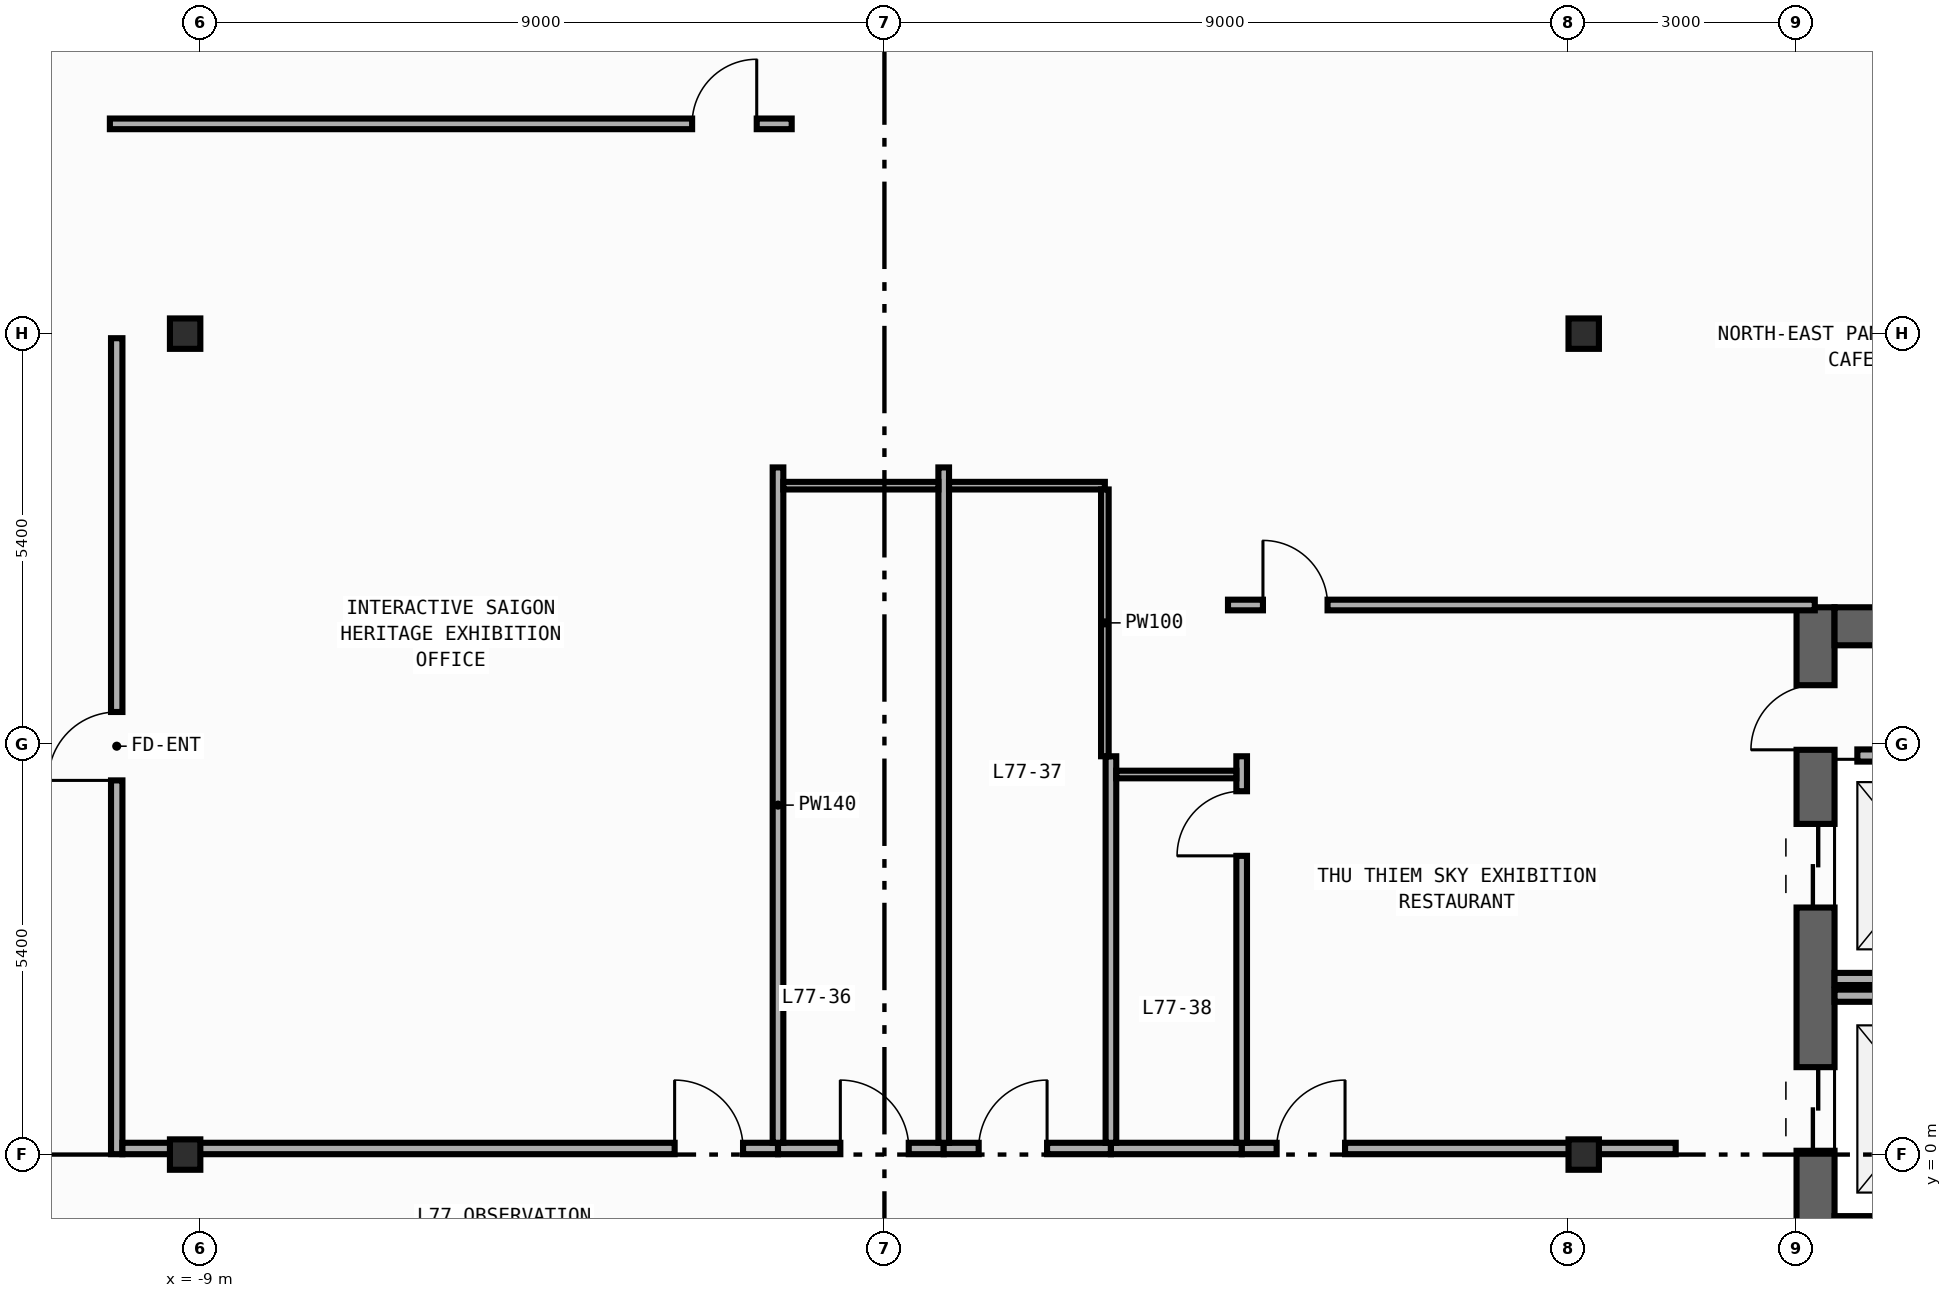
"""IFC4 building model, lengths in metres.
Left out: names, types, materials, properties, quantities, classifications, styles, units other than length and angle.
Written with IfcOpenShell. Run it as: python <this file> out.ifc"""

import sys

from ifc_helpers import new_model, si_unit, direction, frame, frame_2d, origin, origin_2d, place, context, subcontext, project, spatial, rectangle, i_section, extrude, element, fill, save


model = new_model("IFC4")
c1 = context("Model", 3, precision=1e-05, world=origin(), true_north=direction((0.0, 1.0)))
c2 = subcontext(c1, "Body", "Model", "MODEL_VIEW")
j1 = project(units=[si_unit("LENGTHUNIT", "METRE"), si_unit("PLANEANGLEUNIT", "RADIAN")], contexts=[c1])
p1 = place(None, origin())
s1 = spatial("IfcSite", under=j1, at=p1, CompositionType="ELEMENT")
p2 = place(p1, origin())
s2 = spatial("IfcBuilding", under=s1, at=p2, CompositionType="ELEMENT")
p3 = place(p2, frame((0.0, 0.0, 320.4)))
s3 = spatial("IfcBuildingStorey", under=s2, at=p3, CompositionType="ELEMENT", Elevation=320.4)
p4 = place(p3, frame((12.25, -19.8, 0.0), z_axis=(0.0, 0.0, 1.0), x_axis=(0.0, 1.0, 0.0)))
e1 = element("IfcWall", 1, at=p4, inside=s3, PredefinedType="SHEAR", context=c2, shape_type="SweptSolid", body=[
    extrude(rectangle(XDim=27.0, YDim=0.5, at=frame_2d((13.5, 0.0))), origin(), (0.0, 0.0, 1.0), 4.45),
])
p5 = place(p4, frame((23.05, 0.0, 0.0)))
e2 = element("IfcOpeningElement", 2, at=p5, cuts=e1, PredefinedType="OPENING", context=c2, shape_type="SweptSolid", body=[
    extrude(rectangle(XDim=1.1, YDim=2.2, at=frame_2d((0.55, 1.1))), frame((0.0, 0.26, 0.0), z_axis=(0.0, -1.0, 0.0), x_axis=(1.0, 0.0, 0.0)), (0.0, 0.0, 1.0), 0.52),
])
p6 = place(p4, frame((19.85, 0.0, 0.0)))
e3 = element("IfcOpeningElement", 3, at=p6, cuts=e1, PredefinedType="OPENING", context=c2, shape_type="SweptSolid", body=[
    extrude(rectangle(XDim=1.1, YDim=2.2, at=frame_2d((0.55, 1.1))), frame((0.0, 0.26, 0.0), z_axis=(0.0, -1.0, 0.0), x_axis=(1.0, 0.0, 0.0)), (0.0, 0.0, 1.0), 0.52),
])
p7 = place(p4, frame((16.65, 0.0, 0.0)))
e4 = element("IfcOpeningElement", 4, at=p7, cuts=e1, PredefinedType="OPENING", context=c2, shape_type="SweptSolid", body=[
    extrude(rectangle(XDim=1.1, YDim=2.2, at=frame_2d((0.55, 1.1))), frame((0.0, 0.26, 0.0), z_axis=(0.0, -1.0, 0.0), x_axis=(1.0, 0.0, 0.0)), (0.0, 0.0, 1.0), 0.52),
])
p8 = place(p4, frame((10.175, 0.0, 0.0)))
e5 = element("IfcOpeningElement", 5, at=p8, cuts=e1, PredefinedType="OPENING", context=c2, shape_type="SweptSolid", body=[
    extrude(rectangle(XDim=0.85, YDim=2.1, at=frame_2d((0.425, 1.05))), frame((0.0, 0.26, 0.0), z_axis=(0.0, -1.0, 0.0), x_axis=(1.0, 0.0, 0.0)), (0.0, 0.0, 1.0), 0.52),
])
p9 = place(p4, frame((12.725, 0.0, 0.0)))
e6 = element("IfcOpeningElement", 6, at=p9, cuts=e1, PredefinedType="OPENING", context=c2, shape_type="SweptSolid", body=[
    extrude(rectangle(XDim=1.15, YDim=2.2, at=frame_2d((0.575, 1.1))), frame((0.0, 0.26, 0.0), z_axis=(0.0, -1.0, 0.0), x_axis=(1.0, 0.0, 0.0)), (0.0, 0.0, 1.0), 0.52),
])
p10 = place(p4, frame((25.125, 0.0, 0.0)))
e7 = element("IfcOpeningElement", 7, at=p10, cuts=e1, PredefinedType="OPENING", context=c2, shape_type="SweptSolid", body=[
    extrude(rectangle(XDim=0.85, YDim=2.1, at=frame_2d((0.425, 1.05))), frame((0.0, 0.26, 0.0), z_axis=(0.0, -1.0, 0.0), x_axis=(1.0, 0.0, 0.0)), (0.0, 0.0, 1.0), 0.52),
])
p11 = place(p3, frame((12.5, 6.95, 0.0), z_axis=(0.0, 0.0, 1.0), x_axis=(1.0, 0.0, 0.0)))
e8 = element("IfcWall", 8, at=p11, inside=s3, PredefinedType="SHEAR", context=c2, shape_type="SweptSolid", body=[
    extrude(rectangle(XDim=7.4, YDim=0.5, at=frame_2d((3.7, 0.0))), origin(), (0.0, 0.0, 1.0), 4.45),
])
for number, where, z_axis, x_axis in (
    (9, (-9.2, 0.0, 0.0), (0.0, 0.0, 1.0), (1.0, 0.0, 0.0)),
    (10, (-9.2, 10.8, 0.0), (0.0, 0.0, 1.0), (1.0, 0.0, 0.0)),
    (11, (9.2, 0.0, 0.0), (0.0, 0.0, 1.0), (1.0, 0.0, 0.0)),
    (12, (9.2, 10.8, 0.0), (0.0, 0.0, 1.0), (1.0, 0.0, 0.0)),
):
    element("IfcColumn", number, at=place(p3, frame(where, z_axis=z_axis, x_axis=x_axis)), inside=s3, PredefinedType="COLUMN", context=c2, shape_type="SweptSolid", body=[
        extrude(i_section(OverallWidth=0.4, OverallDepth=0.4, WebThickness=0.013, FlangeThickness=0.021, FilletRadius=0.022, at=origin_2d()), origin(), (0.0, 0.0, 1.0), 4.8),
    ])
for number, where, z_axis, x_axis in (
    (13, (12.5, 2.31, 0.0), (0.0, 0.0, 1.0), (1.0, 0.0, 0.0)),
    (14, (12.5, -0.89, 0.0), (0.0, 0.0, 1.0), (1.0, 0.0, 0.0)),
    (15, (12.5, 2.09, 0.0), (0.0, 0.0, 1.0), (1.0, 0.0, 0.0)),
):
    element("IfcWall", number, at=place(p3, frame(where, z_axis=z_axis, x_axis=x_axis)), inside=s3, PredefinedType="STANDARD", context=c2, shape_type="SweptSolid", body=[
        extrude(rectangle(XDim=2.49, YDim=0.16, at=frame_2d((1.245, 0.0))), origin(), (0.0, 0.0, 1.0), 4.45),
    ])
p12 = place(p3, frame((12.8, 5.25, 0.0), z_axis=(0.0, 0.0, 1.0), x_axis=(1.0, 0.0, 0.0)))
e16 = element("IfcWall", 16, at=p12, inside=s3, PredefinedType="STANDARD", context=c2, shape_type="SweptSolid", body=[
    extrude(rectangle(XDim=2.6, YDim=0.16, at=frame_2d((1.3, 0.0))), origin(), (0.0, 0.0, 1.0), 4.45),
])
p13 = place(p3, frame((-10.1, 0.005, 0.0), z_axis=(0.0, 0.0, 1.0), x_axis=(0.0, 1.0, 0.0)))
e17 = element("IfcWall", 17, at=p13, inside=s3, PredefinedType="PARTITIONING", context=c2, shape_type="SweptSolid", body=[
    extrude(rectangle(XDim=10.735, YDim=0.15, at=frame_2d((5.368, 0.0))), origin(), (0.0, 0.0, 1.0), 4.45),
])
p14 = place(p13, frame((4.917, 0.0, 0.0)))
e18 = element("IfcOpeningElement", 18, at=p14, cuts=e17, PredefinedType="OPENING", context=c2, shape_type="SweptSolid", body=[
    extrude(rectangle(XDim=0.9, YDim=2.15, at=frame_2d((0.45, 1.075))), frame((0.0, 0.085, 0.0), z_axis=(0.0, -1.0, 0.0), x_axis=(1.0, 0.0, 0.0)), (0.0, 0.0, 1.0), 0.17),
])
p15 = place(p3, frame((-10.025, 0.08, 0.0), z_axis=(0.0, 0.0, 1.0), x_axis=(1.0, 0.0, 0.0)))
e19 = element("IfcWall", 19, at=p15, inside=s3, PredefinedType="PARTITIONING", context=c2, shape_type="SweptSolid", body=[
    extrude(rectangle(XDim=8.625, YDim=0.15, at=frame_2d((4.312, 0.0))), origin(), (0.0, 0.0, 1.0), 3.55),
])
p16 = place(p15, frame((7.265, 0.0, 0.0)))
e20 = element("IfcOpeningElement", 20, at=p16, cuts=e19, PredefinedType="OPENING", context=c2, shape_type="SweptSolid", body=[
    extrude(rectangle(XDim=0.9, YDim=2.15, at=frame_2d((0.45, 1.075))), frame((0.0, 0.085, 0.0), z_axis=(0.0, -1.0, 0.0), x_axis=(1.0, 0.0, 0.0)), (0.0, 0.0, 1.0), 0.17),
])
p17 = place(p3, frame((4.7, 0.08, 0.0), z_axis=(0.0, 0.0, 1.0), x_axis=(1.0, 0.0, 0.0)))
e21 = element("IfcWall", 21, at=p17, inside=s3, PredefinedType="PARTITIONING", context=c2, shape_type="SweptSolid", body=[
    extrude(rectangle(XDim=5.71, YDim=0.15, at=frame_2d((2.855, 0.0))), origin(), (0.0, 0.0, 1.0), 3.55),
])
p18 = place(p17, frame((0.46, 0.0, 0.0)))
e22 = element("IfcOpeningElement", 22, at=p18, cuts=e21, PredefinedType="OPENING", context=c2, shape_type="SweptSolid", body=[
    extrude(rectangle(XDim=0.9, YDim=2.15, at=frame_2d((0.45, 1.075))), frame((0.0, 0.085, 0.0), z_axis=(0.0, -1.0, 0.0), x_axis=(1.0, 0.0, 0.0)), (0.0, 0.0, 1.0), 0.17),
])
p19 = place(p3, frame((-1.4, 0.08, 0.0), z_axis=(0.0, 0.0, 1.0), x_axis=(1.0, 0.0, 0.0)))
e23 = element("IfcWall", 23, at=p19, inside=s3, PredefinedType="PARTITIONING", context=c2, shape_type="SweptSolid", body=[
    extrude(rectangle(XDim=2.18, YDim=0.15, at=frame_2d((1.09, 0.0))), origin(), (0.0, 0.0, 1.0), 3.55),
])
p20 = place(p19, frame((0.82, 0.0, 0.0)))
e24 = element("IfcOpeningElement", 24, at=p20, cuts=e23, PredefinedType="OPENING", context=c2, shape_type="SweptSolid", body=[
    extrude(rectangle(XDim=0.9, YDim=2.15, at=frame_2d((0.45, 1.075))), frame((0.0, 0.085, 0.0), z_axis=(0.0, -1.0, 0.0), x_axis=(1.0, 0.0, 0.0)), (0.0, 0.0, 1.0), 0.17),
])
p21 = place(p3, frame((0.78, 0.08, 0.0), z_axis=(0.0, 0.0, 1.0), x_axis=(1.0, 0.0, 0.0)))
e25 = element("IfcWall", 25, at=p21, inside=s3, PredefinedType="PARTITIONING", context=c2, shape_type="SweptSolid", body=[
    extrude(rectangle(XDim=2.2, YDim=0.15, at=frame_2d((1.1, 0.0))), origin(), (0.0, 0.0, 1.0), 3.55),
])
p22 = place(p21, frame((0.46, 0.0, 0.0)))
e26 = element("IfcOpeningElement", 26, at=p22, cuts=e25, PredefinedType="OPENING", context=c2, shape_type="SweptSolid", body=[
    extrude(rectangle(XDim=0.9, YDim=2.15, at=frame_2d((0.45, 1.075))), frame((0.0, 0.085, 0.0), z_axis=(0.0, -1.0, 0.0), x_axis=(1.0, 0.0, 0.0)), (0.0, 0.0, 1.0), 0.17),
])
p23 = place(p3, frame((2.98, 0.08, 0.0), z_axis=(0.0, 0.0, 1.0), x_axis=(1.0, 0.0, 0.0)))
e27 = element("IfcWall", 27, at=p23, inside=s3, PredefinedType="PARTITIONING", context=c2, shape_type="SweptSolid", body=[
    extrude(rectangle(XDim=1.72, YDim=0.15, at=frame_2d((0.86, 0.0))), origin(), (0.0, 0.0, 1.0), 3.55),
])
p24 = place(p3, frame((-10.19, 13.56, 0.0), z_axis=(0.0, 0.0, 1.0), x_axis=(1.0, 0.0, 0.0)))
e28 = element("IfcWall", 28, at=p24, inside=s3, PredefinedType="PARTITIONING", context=c2, shape_type="SweptSolid", body=[
    extrude(rectangle(XDim=8.97, YDim=0.14, at=frame_2d((4.485, 0.0))), origin(), (0.0, 0.0, 1.0), 4.45),
])
p25 = place(p24, frame((7.66, 0.0, 0.0)))
e29 = element("IfcOpeningElement", 29, at=p25, cuts=e28, PredefinedType="OPENING", context=c2, shape_type="SweptSolid", body=[
    extrude(rectangle(XDim=0.85, YDim=2.1, at=frame_2d((0.425, 1.05))), frame((0.0, 0.08, 0.0), z_axis=(0.0, -1.0, 0.0), x_axis=(1.0, 0.0, 0.0)), (0.0, 0.0, 1.0), 0.16),
])
p26 = place(p3, frame((-1.4, 0.155, 0.0), z_axis=(0.0, 0.0, 1.0), x_axis=(0.0, 1.0, 0.0)))
e30 = element("IfcWall", 30, at=p26, inside=s3, PredefinedType="PARTITIONING", context=c2, shape_type="SweptSolid", body=[
    extrude(rectangle(XDim=8.885, YDim=0.14, at=frame_2d((4.442, 0.0))), origin(), (0.0, 0.0, 1.0), 4.45),
])
p27 = place(p3, frame((4.52, 7.23, 0.0), z_axis=(0.0, 0.0, 1.0), x_axis=(1.0, 0.0, 0.0)))
e31 = element("IfcWall", 31, at=p27, inside=s3, PredefinedType="PARTITIONING", context=c2, shape_type="SweptSolid", body=[
    extrude(rectangle(XDim=7.72, YDim=0.14, at=frame_2d((3.86, 0.0))), origin(), (0.0, 0.0, 1.0), 3.55),
])
p28 = place(p27, frame((0.46, 0.0, 0.0)))
e32 = element("IfcOpeningElement", 32, at=p28, cuts=e31, PredefinedType="OPENING", context=c2, shape_type="SweptSolid", body=[
    extrude(rectangle(XDim=0.85, YDim=2.1, at=frame_2d((0.425, 1.05))), frame((0.0, 0.08, 0.0), z_axis=(0.0, -1.0, 0.0), x_axis=(1.0, 0.0, 0.0)), (0.0, 0.0, 1.0), 0.16),
])
p29 = place(p3, frame((4.7, 0.155, 0.0), z_axis=(0.0, 0.0, 1.0), x_axis=(0.0, 1.0, 0.0)))
e33 = element("IfcWall", 33, at=p29, inside=s3, PredefinedType="PARTITIONING", context=c2, shape_type="SweptSolid", body=[
    extrude(rectangle(XDim=5.085, YDim=0.14, at=frame_2d((2.542, 0.0))), origin(), (0.0, 0.0, 1.0), 4.1),
])
p30 = place(p29, frame((3.775, 0.0, 0.0)))
e34 = element("IfcOpeningElement", 34, at=p30, cuts=e33, PredefinedType="OPENING", context=c2, shape_type="SweptSolid", body=[
    extrude(rectangle(XDim=0.85, YDim=2.1, at=frame_2d((0.425, 1.05))), frame((0.0, 0.08, 0.0), z_axis=(0.0, -1.0, 0.0), x_axis=(1.0, 0.0, 0.0)), (0.0, 0.0, 1.0), 0.16),
])
p31 = place(p3, frame((0.78, 0.155, 0.0), z_axis=(0.0, 0.0, 1.0), x_axis=(0.0, 1.0, 0.0)))
e35 = element("IfcWall", 35, at=p31, inside=s3, PredefinedType="PARTITIONING", context=c2, shape_type="SweptSolid", body=[
    extrude(rectangle(XDim=8.885, YDim=0.14, at=frame_2d((4.442, 0.0))), origin(), (0.0, 0.0, 1.0), 4.45),
])
p32 = place(p3, frame((2.98, 0.155, 0.0), z_axis=(0.0, 0.0, 1.0), x_axis=(0.0, 1.0, 0.0)))
e36 = element("IfcWall", 36, at=p32, inside=s3, PredefinedType="PARTITIONING", context=c2, shape_type="SweptSolid", body=[
    extrude(rectangle(XDim=5.085, YDim=0.14, at=frame_2d((2.542, 0.0))), origin(), (0.0, 0.0, 1.0), 4.45),
])
p33 = place(p3, frame((-1.33, 8.8, 0.0), z_axis=(0.0, 0.0, 1.0), x_axis=(1.0, 0.0, 0.0)))
e37 = element("IfcWall", 37, at=p33, inside=s3, PredefinedType="PARTITIONING", context=c2, shape_type="SweptSolid", body=[
    extrude(rectangle(XDim=2.04, YDim=0.1, at=frame_2d((1.02, 0.0))), origin(), (0.0, 0.0, 1.0), 4.45),
])
p34 = place(p3, frame((0.85, 8.8, 0.0), z_axis=(0.0, 0.0, 1.0), x_axis=(1.0, 0.0, 0.0)))
e38 = element("IfcWall", 38, at=p34, inside=s3, PredefinedType="PARTITIONING", context=c2, shape_type="SweptSolid", body=[
    extrude(rectangle(XDim=2.05, YDim=0.1, at=frame_2d((1.025, 0.0))), origin(), (0.0, 0.0, 1.0), 4.45),
])
p35 = place(p3, frame((2.9, 8.75, 0.0), z_axis=(0.0, 0.0, 1.0), x_axis=(0.0, -1.0, 0.0)))
e39 = element("IfcWall", 39, at=p35, inside=s3, PredefinedType="PARTITIONING", context=c2, shape_type="SweptSolid", body=[
    extrude(rectangle(XDim=3.51, YDim=0.1, at=frame_2d((1.755, 0.0))), origin(), (0.0, 0.0, 1.0), 4.45),
])
p36 = place(p3, frame((3.05, 5.0, 0.0), z_axis=(0.0, 0.0, 1.0), x_axis=(1.0, 0.0, 0.0)))
e40 = element("IfcWall", 40, at=p36, inside=s3, PredefinedType="PARTITIONING", context=c2, shape_type="SweptSolid", body=[
    extrude(rectangle(XDim=1.58, YDim=0.1, at=frame_2d((0.79, 0.0))), origin(), (0.0, 0.0, 1.0), 4.45),
])
p37 = place(p5, origin())
e41 = element("IfcDoor", 41, at=p37, inside=s3, OperationType="DOUBLE_DOOR_SLIDING", PredefinedType="DOOR", context=c2, shape_type="SweptSolid", body=[
    extrude(rectangle(XDim=1.1, YDim=2.2, at=frame_2d((0.55, 1.1))), frame((0.0, 0.025, 0.0), z_axis=(0.0, -1.0, 0.0), x_axis=(1.0, 0.0, 0.0)), (0.0, 0.0, 1.0), 0.05),
])
fill(e2, e41)
p38 = place(p6, origin())
e42 = element("IfcDoor", 42, at=p38, inside=s3, OperationType="DOUBLE_DOOR_SLIDING", PredefinedType="DOOR", context=c2, shape_type="SweptSolid", body=[
    extrude(rectangle(XDim=1.1, YDim=2.2, at=frame_2d((0.55, 1.1))), frame((0.0, 0.025, 0.0), z_axis=(0.0, -1.0, 0.0), x_axis=(1.0, 0.0, 0.0)), (0.0, 0.0, 1.0), 0.05),
])
fill(e3, e42)
p39 = place(p10, origin())
e43 = element("IfcDoor", 43, at=p39, inside=s3, OperationType="SINGLE_SWING_LEFT", PredefinedType="DOOR", context=c2, shape_type="SweptSolid", body=[
    extrude(rectangle(XDim=0.85, YDim=2.1, at=frame_2d((0.425, 1.05))), frame((0.0, 0.025, 0.0), z_axis=(0.0, -1.0, 0.0), x_axis=(1.0, 0.0, 0.0)), (0.0, 0.0, 1.0), 0.05),
])
fill(e7, e43)
p40 = place(p14, origin())
e44 = element("IfcDoor", 44, at=p40, inside=s3, OperationType="SINGLE_SWING_LEFT", PredefinedType="DOOR", context=c2, shape_type="SweptSolid", body=[
    extrude(rectangle(XDim=0.9, YDim=2.15, at=frame_2d((0.45, 1.075))), frame((0.0, 0.025, 0.0), z_axis=(0.0, -1.0, 0.0), x_axis=(1.0, 0.0, 0.0)), (0.0, 0.0, 1.0), 0.05),
])
fill(e18, e44)
p41 = place(p16, origin())
e45 = element("IfcDoor", 45, at=p41, inside=s3, OperationType="SINGLE_SWING_LEFT", PredefinedType="DOOR", context=c2, shape_type="SweptSolid", body=[
    extrude(rectangle(XDim=0.9, YDim=2.15, at=frame_2d((0.45, 1.075))), frame((0.0, 0.025, 0.0), z_axis=(0.0, -1.0, 0.0), x_axis=(1.0, 0.0, 0.0)), (0.0, 0.0, 1.0), 0.05),
])
fill(e20, e45)
p42 = place(p18, origin())
e46 = element("IfcDoor", 46, at=p42, inside=s3, OperationType="SINGLE_SWING_RIGHT", PredefinedType="DOOR", context=c2, shape_type="SweptSolid", body=[
    extrude(rectangle(XDim=0.9, YDim=2.15, at=frame_2d((0.45, 1.075))), frame((0.0, 0.025, 0.0), z_axis=(0.0, -1.0, 0.0), x_axis=(1.0, 0.0, 0.0)), (0.0, 0.0, 1.0), 0.05),
])
fill(e22, e46)
p43 = place(p20, origin())
e47 = element("IfcDoor", 47, at=p43, inside=s3, OperationType="SINGLE_SWING_LEFT", PredefinedType="DOOR", context=c2, shape_type="SweptSolid", body=[
    extrude(rectangle(XDim=0.9, YDim=2.15, at=frame_2d((0.45, 1.075))), frame((0.0, 0.025, 0.0), z_axis=(0.0, -1.0, 0.0), x_axis=(1.0, 0.0, 0.0)), (0.0, 0.0, 1.0), 0.05),
])
fill(e24, e47)
p44 = place(p22, origin())
e48 = element("IfcDoor", 48, at=p44, inside=s3, OperationType="SINGLE_SWING_RIGHT", PredefinedType="DOOR", context=c2, shape_type="SweptSolid", body=[
    extrude(rectangle(XDim=0.9, YDim=2.15, at=frame_2d((0.45, 1.075))), frame((0.0, 0.025, 0.0), z_axis=(0.0, -1.0, 0.0), x_axis=(1.0, 0.0, 0.0)), (0.0, 0.0, 1.0), 0.05),
])
fill(e26, e48)
p45 = place(p25, origin())
e49 = element("IfcDoor", 49, at=p45, inside=s3, OperationType="SINGLE_SWING_RIGHT", PredefinedType="DOOR", context=c2, shape_type="SweptSolid", body=[
    extrude(rectangle(XDim=0.85, YDim=2.1, at=frame_2d((0.425, 1.05))), frame((0.0, 0.025, 0.0), z_axis=(0.0, -1.0, 0.0), x_axis=(1.0, 0.0, 0.0)), (0.0, 0.0, 1.0), 0.05),
])
fill(e29, e49)
p46 = place(p28, origin())
e50 = element("IfcDoor", 50, at=p46, inside=s3, OperationType="SINGLE_SWING_LEFT", PredefinedType="DOOR", context=c2, shape_type="SweptSolid", body=[
    extrude(rectangle(XDim=0.85, YDim=2.1, at=frame_2d((0.425, 1.05))), frame((0.0, 0.025, 0.0), z_axis=(0.0, -1.0, 0.0), x_axis=(1.0, 0.0, 0.0)), (0.0, 0.0, 1.0), 0.05),
])
fill(e32, e50)
p47 = place(p30, origin())
e51 = element("IfcDoor", 51, at=p47, inside=s3, OperationType="SINGLE_SWING_LEFT", PredefinedType="DOOR", context=c2, shape_type="SweptSolid", body=[
    extrude(rectangle(XDim=0.85, YDim=2.1, at=frame_2d((0.425, 1.05))), frame((0.0, 0.025, 0.0), z_axis=(0.0, -1.0, 0.0), x_axis=(1.0, 0.0, 0.0)), (0.0, 0.0, 1.0), 0.05),
])
fill(e34, e51)
save(model, sys.argv[1])
